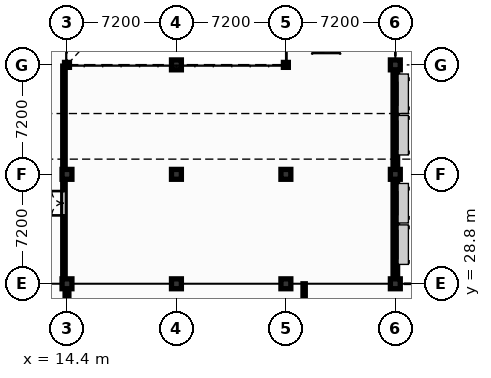
"""IFC4 building model, lengths in metres.
Left out: names, types, materials, properties, quantities, classifications, styles, units other than length and angle.
Written with IfcOpenShell. Run it as: python <this file> out.ifc"""

import sys

from ifc_helpers import new_model, si_unit, direction, frame, frame_2d, origin, origin_2d, place, context, subcontext, project, spatial, rectangle, hollow_circle, extrude, element, fill, save


model = new_model("IFC4")
c1 = context("Model", 3, precision=1e-05, world=origin(), true_north=direction((0.0, 1.0)))
c2 = subcontext(c1, "Body", "Model", "MODEL_VIEW")
j1 = project(units=[si_unit("LENGTHUNIT", "METRE"), si_unit("PLANEANGLEUNIT", "RADIAN")], contexts=[c1])
p1 = place(None, origin())
s1 = spatial("IfcSite", under=j1, at=p1, CompositionType="ELEMENT")
p2 = place(p1, origin())
s2 = spatial("IfcBuilding", under=s1, at=p2, CompositionType="ELEMENT")
p3 = place(p2, frame((0.0, 0.0, 5.1)))
s3 = spatial("IfcBuildingStorey", under=s2, at=p3, CompositionType="ELEMENT", Elevation=5.1)
for number, where, z_axis, x_axis in (
    (1, (14.4, 28.8, 0.0), (0.0, 0.0, 1.0), (1.0, 0.0, 0.0)),
    (2, (14.4, 36.0, 0.0), (0.0, 0.0, 1.0), (1.0, 0.0, 0.0)),
):
    element("IfcColumn", number, at=place(p3, frame(where, z_axis=z_axis, x_axis=x_axis)), inside=s3, PredefinedType="COLUMN", context=c2, shape_type="SweptSolid", body=[
        extrude(rectangle(XDim=0.65, YDim=0.65, at=origin_2d()), origin(), (0.0, 0.0, 1.0), 3.84),
    ])
p4 = place(p3, frame((14.4, 43.2, 0.0), z_axis=(0.0, 0.0, 1.0), x_axis=(1.0, 0.0, 0.0)))
e3 = element("IfcColumn", 3, at=p4, inside=s3, PredefinedType="COLUMN", context=c2, shape_type="SweptSolid", body=[
    extrude(hollow_circle(Radius=0.162, WallThickness=0.012, at=origin_2d()), origin(), (0.0, 0.0, 1.0), 3.84),
])
for number, where, z_axis, x_axis in (
    (4, (21.6, 28.8, 0.0), (0.0, 0.0, 1.0), (1.0, 0.0, 0.0)),
    (5, (21.6, 36.0, 0.0), (0.0, 0.0, 1.0), (1.0, 0.0, 0.0)),
    (6, (21.6, 43.2, 0.0), (0.0, 0.0, 1.0), (1.0, 0.0, 0.0)),
    (7, (28.8, 28.8, 0.0), (0.0, 0.0, 1.0), (1.0, 0.0, 0.0)),
    (8, (28.8, 36.0, 0.0), (0.0, 0.0, 1.0), (1.0, 0.0, 0.0)),
):
    element("IfcColumn", number, at=place(p3, frame(where, z_axis=z_axis, x_axis=x_axis)), inside=s3, PredefinedType="COLUMN", context=c2, shape_type="SweptSolid", body=[
        extrude(rectangle(XDim=0.65, YDim=0.65, at=origin_2d()), origin(), (0.0, 0.0, 1.0), 3.84),
    ])
p5 = place(p3, frame((28.8, 43.2, 0.0), z_axis=(0.0, 0.0, 1.0), x_axis=(1.0, 0.0, 0.0)))
e9 = element("IfcColumn", 9, at=p5, inside=s3, PredefinedType="COLUMN", context=c2, shape_type="SweptSolid", body=[
    extrude(hollow_circle(Radius=0.162, WallThickness=0.012, at=origin_2d()), origin(), (0.0, 0.0, 1.0), 3.84),
])
for number, where, z_axis, x_axis in (
    (10, (36.0, 28.8, 0.0), (0.0, 0.0, 1.0), (1.0, 0.0, 0.0)),
    (11, (36.0, 36.0, 0.0), (0.0, 0.0, 1.0), (1.0, 0.0, 0.0)),
    (12, (36.0, 43.2, 0.0), (0.0, 0.0, 1.0), (1.0, 0.0, 0.0)),
):
    element("IfcColumn", number, at=place(p3, frame(where, z_axis=z_axis, x_axis=x_axis)), inside=s3, PredefinedType="COLUMN", context=c2, shape_type="SweptSolid", body=[
        extrude(rectangle(XDim=0.65, YDim=0.65, at=origin_2d()), origin(), (0.0, 0.0, 1.0), 3.84),
    ])
p6 = place(p3, frame((36.0, 28.8, 0.0), z_axis=(0.0, 0.0, 1.0), x_axis=(0.0, 1.0, 0.0)))
e13 = element("IfcWall", 13, at=p6, inside=s3, PredefinedType="SOLIDWALL", context=c2, shape_type="SweptSolid", body=[
    extrude(rectangle(XDim=7.2, YDim=0.3, at=frame_2d((3.6, 0.0))), origin(), (0.0, 0.0, 1.0), 3.117),
])
p7 = place(p6, frame((1.6, 0.0, 0.85)))
e14 = element("IfcOpeningElement", 14, at=p7, cuts=e13, PredefinedType="OPENING", context=c2, shape_type="SweptSolid", body=[
    extrude(rectangle(XDim=1.95, YDim=2.1, at=frame_2d((0.975, 1.05))), frame((0.0, 0.16, 0.0), z_axis=(0.0, -1.0, 0.0), x_axis=(1.0, 0.0, 0.0)), (0.0, 0.0, 1.0), 0.32),
])
p8 = place(p6, frame((4.5, 0.0, 0.85)))
e15 = element("IfcOpeningElement", 15, at=p8, cuts=e13, PredefinedType="OPENING", context=c2, shape_type="SweptSolid", body=[
    extrude(rectangle(XDim=1.6, YDim=2.05, at=frame_2d((0.8, 1.025))), frame((0.0, 0.16, 0.0), z_axis=(0.0, -1.0, 0.0), x_axis=(1.0, 0.0, 0.0)), (0.0, 0.0, 1.0), 0.32),
])
p9 = place(p3, frame((36.0, 36.0, 0.0), z_axis=(0.0, 0.0, 1.0), x_axis=(0.0, 1.0, 0.0)))
e16 = element("IfcWall", 16, at=p9, inside=s3, PredefinedType="SOLIDWALL", context=c2, shape_type="SweptSolid", body=[
    extrude(rectangle(XDim=7.2, YDim=0.3, at=frame_2d((3.6, 0.0))), origin(), (0.0, 0.0, 1.0), 3.087),
])
p10 = place(p9, frame((1.6, 0.0, 0.85)))
e17 = element("IfcOpeningElement", 17, at=p10, cuts=e16, PredefinedType="OPENING", context=c2, shape_type="SweptSolid", body=[
    extrude(rectangle(XDim=1.95, YDim=2.1, at=frame_2d((0.975, 1.05))), frame((0.0, 0.16, 0.0), z_axis=(0.0, -1.0, 0.0), x_axis=(1.0, 0.0, 0.0)), (0.0, 0.0, 1.0), 0.32),
])
p11 = place(p9, frame((4.5, 0.0, 0.85)))
e18 = element("IfcOpeningElement", 18, at=p11, cuts=e16, PredefinedType="OPENING", context=c2, shape_type="SweptSolid", body=[
    extrude(rectangle(XDim=1.6, YDim=2.05, at=frame_2d((0.8, 1.025))), frame((0.0, 0.16, 0.0), z_axis=(0.0, -1.0, 0.0), x_axis=(1.0, 0.0, 0.0)), (0.0, 0.0, 1.0), 0.32),
])
p12 = place(p3, frame((14.2, 28.8, 0.0), z_axis=(0.0, 0.0, 1.0), x_axis=(0.0, 1.0, 0.0)))
e19 = element("IfcWall", 19, at=p12, inside=s3, PredefinedType="PARTITIONING", context=c2, shape_type="SweptSolid", body=[
    extrude(rectangle(XDim=14.32, YDim=0.16, at=frame_2d((7.16, 0.0))), origin(), (0.0, 0.0, 1.0), 2.943),
])
p13 = place(p12, frame((4.5, 0.0, 0.0)))
e20 = element("IfcOpeningElement", 20, at=p13, cuts=e19, PredefinedType="OPENING", context=c2, shape_type="SweptSolid", body=[
    extrude(rectangle(XDim=1.6, YDim=2.2, at=frame_2d((0.8, 1.1))), frame((0.0, 0.09, 0.0), z_axis=(0.0, -1.0, 0.0), x_axis=(1.0, 0.0, 0.0)), (0.0, 0.0, 1.0), 0.18),
])
p14 = place(p3, frame((14.4, 9.0, 0.0), z_axis=(0.0, 0.0, 1.0), x_axis=(0.0, 1.0, 0.0)))
e21 = element("IfcWall", 21, at=p14, inside=s3, PredefinedType="PARTITIONING", context=c2, shape_type="SweptSolid", body=[
    extrude(rectangle(XDim=19.8, YDim=0.25, at=frame_2d((9.9, 0.0))), origin(), (0.0, 0.0, 1.0), 2.755),
])
p15 = place(p14, frame((1.8, 0.0, 0.0)))
e22 = element("IfcOpeningElement", 22, at=p15, cuts=e21, PredefinedType="OPENING", context=c2, shape_type="SweptSolid", body=[
    extrude(rectangle(XDim=1.8, YDim=2.3, at=frame_2d((0.9, 1.15))), frame((0.0, 0.135, 0.0), z_axis=(0.0, -1.0, 0.0), x_axis=(1.0, 0.0, 0.0)), (0.0, 0.0, 1.0), 0.27),
])
p16 = place(p14, frame((8.2, 0.0, 0.0)))
e23 = element("IfcOpeningElement", 23, at=p16, cuts=e21, PredefinedType="OPENING", context=c2, shape_type="SweptSolid", body=[
    extrude(rectangle(XDim=1.8, YDim=2.3, at=frame_2d((0.9, 1.15))), frame((0.0, 0.135, 0.0), z_axis=(0.0, -1.0, 0.0), x_axis=(1.0, 0.0, 0.0)), (0.0, 0.0, 1.0), 0.27),
])
p17 = place(p3, frame((30.0, 14.4, 0.0), z_axis=(0.0, 0.0, 1.0), x_axis=(0.0, 1.0, 0.0)))
e24 = element("IfcWall", 24, at=p17, inside=s3, PredefinedType="PARTITIONING", context=c2, shape_type="SweptSolid", body=[
    extrude(rectangle(XDim=14.4, YDim=0.15, at=frame_2d((7.2, 0.0))), origin(), (0.0, 0.0, 1.0), 3.55),
])
p18 = place(p7, origin())
e25 = element("IfcWindow", 25, at=p18, inside=s3, PartitioningType="SINGLE_PANEL", PredefinedType="WINDOW", context=c2, shape_type="SweptSolid", body=[
    extrude(rectangle(XDim=1.95, YDim=2.1, at=frame_2d((0.975, 1.05))), frame((0.0, 0.03, 0.0), z_axis=(0.0, -1.0, 0.0), x_axis=(1.0, 0.0, 0.0)), (0.0, 0.0, 1.0), 0.06),
])
fill(e14, e25)
p19 = place(p8, origin())
e26 = element("IfcWindow", 26, at=p19, inside=s3, PartitioningType="SINGLE_PANEL", PredefinedType="WINDOW", context=c2, shape_type="SweptSolid", body=[
    extrude(rectangle(XDim=1.6, YDim=2.05, at=frame_2d((0.8, 1.025))), frame((0.0, 0.03, 0.0), z_axis=(0.0, -1.0, 0.0), x_axis=(1.0, 0.0, 0.0)), (0.0, 0.0, 1.0), 0.06),
])
fill(e15, e26)
p20 = place(p10, origin())
e27 = element("IfcWindow", 27, at=p20, inside=s3, PartitioningType="SINGLE_PANEL", PredefinedType="WINDOW", context=c2, shape_type="SweptSolid", body=[
    extrude(rectangle(XDim=1.95, YDim=2.1, at=frame_2d((0.975, 1.05))), frame((0.0, 0.03, 0.0), z_axis=(0.0, -1.0, 0.0), x_axis=(1.0, 0.0, 0.0)), (0.0, 0.0, 1.0), 0.06),
])
fill(e17, e27)
p21 = place(p11, origin())
e28 = element("IfcWindow", 28, at=p21, inside=s3, PartitioningType="SINGLE_PANEL", PredefinedType="WINDOW", context=c2, shape_type="SweptSolid", body=[
    extrude(rectangle(XDim=1.6, YDim=2.05, at=frame_2d((0.8, 1.025))), frame((0.0, 0.03, 0.0), z_axis=(0.0, -1.0, 0.0), x_axis=(1.0, 0.0, 0.0)), (0.0, 0.0, 1.0), 0.06),
])
fill(e18, e28)
p22 = place(p13, origin())
e29 = element("IfcDoor", 29, at=p22, inside=s3, OperationType="DOUBLE_DOOR_SINGLE_SWING", PredefinedType="DOOR", context=c2, shape_type="SweptSolid", body=[
    extrude(rectangle(XDim=1.6, YDim=2.2, at=frame_2d((0.8, 1.1))), frame((0.0, 0.025, 0.0), z_axis=(0.0, -1.0, 0.0), x_axis=(1.0, 0.0, 0.0)), (0.0, 0.0, 1.0), 0.05),
])
fill(e20, e29)
save(model, sys.argv[1])
